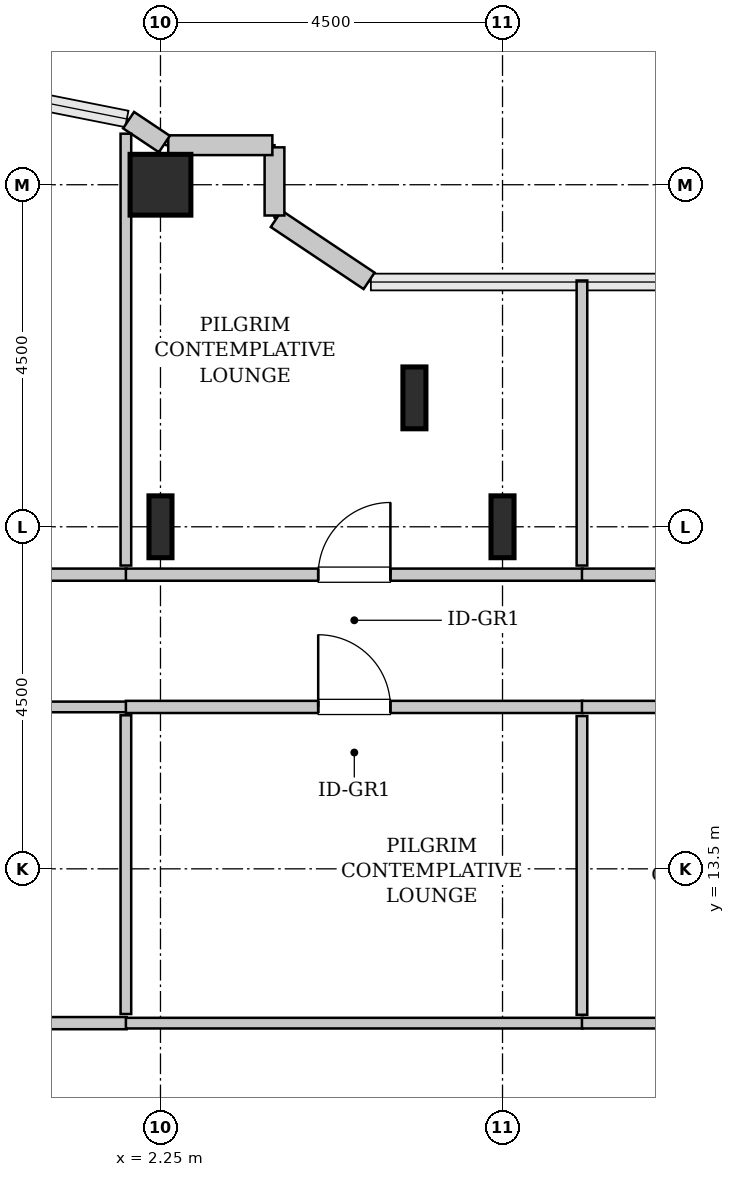
"""IFC4 building model, lengths in metres.
Left out: names, types, materials, properties, quantities, classifications, styles, units other than length and angle.
Written with IfcOpenShell. Run it as: python <this file> out.ifc"""

import sys

from ifc_helpers import new_model, si_unit, direction, frame, frame_2d, origin, origin_2d, place, context, subcontext, project, spatial, rectangle, hollow_rectangle, i_section, extrude, source, transform, mapped, element, fill, save


model = new_model("IFC4")
c1 = context("Model", 3, precision=1e-05, world=origin(), true_north=direction((0.0, 1.0)))
c2 = subcontext(c1, "Body", "Model", "MODEL_VIEW")
j1 = project(units=[si_unit("LENGTHUNIT", "METRE"), si_unit("PLANEANGLEUNIT", "RADIAN")], contexts=[c1])
p1 = place(None, origin())
s1 = spatial("IfcSite", under=j1, at=p1, CompositionType="ELEMENT")
p2 = place(p1, origin())
s2 = spatial("IfcBuilding", under=s1, at=p2, CompositionType="ELEMENT")
p3 = place(p2, frame((0.0, 0.0, 175.4)))
s3 = spatial("IfcBuildingStorey", under=s2, at=p3, CompositionType="ELEMENT", Elevation=175.4)
m1 = source(origin(), c2, "Body", "SweptSolid", [
    extrude(i_section(OverallWidth=0.303, OverallDepth=0.814, WebThickness=0.021, FlangeThickness=0.04, FilletRadius=0.03, at=origin_2d()), origin(), (0.0, 0.0, 1.0), 3.8),
])
p4 = place(p3, frame((2.25, 18.0, 0.0), z_axis=(0.0, 0.0, 1.0), x_axis=(1.0, 0.0, 0.0)))
e1 = element("IfcColumn", 1, at=p4, inside=s3, PredefinedType="COLUMN", context=c2, shape_type="MappedRepresentation", body=[
    mapped(m1, transform((0.0, 0.0, 0.0), x_axis=(1.0, 0.0, 0.0), y_axis=(0.0, 1.0, 0.0), z_axis=(0.0, 0.0, 1.0), scale=1.0)),
])
m2 = source(origin(), c2, "Body", "SweptSolid", [
    extrude(hollow_rectangle(XDim=0.8, YDim=0.8, WallThickness=0.04, InnerFilletRadius=0.04, OuterFilletRadius=0.08, at=origin_2d()), origin(), (0.0, 0.0, 1.0), 3.8),
])
p5 = place(p3, frame((2.25, 22.5, 0.0), z_axis=(0.0, 0.0, 1.0), x_axis=(1.0, 0.0, 0.0)))
e2 = element("IfcColumn", 2, at=p5, inside=s3, PredefinedType="COLUMN", context=c2, shape_type="MappedRepresentation", body=[
    mapped(m2, transform((0.0, 0.0, 0.0), x_axis=(1.0, 0.0, 0.0), y_axis=(0.0, 1.0, 0.0), z_axis=(0.0, 0.0, 1.0), scale=1.0)),
])
for number, where, z_axis, x_axis in (
    (3, (5.591, 19.696, 0.0), (0.0, 0.0, 1.0), (1.0, 0.0, 0.0)),
    (4, (6.75, 18.0, 0.0), (0.0, 0.0, 1.0), (1.0, 0.0, 0.0)),
):
    element("IfcColumn", number, at=place(p3, frame(where, z_axis=z_axis, x_axis=x_axis)), inside=s3, PredefinedType="COLUMN", context=c2, shape_type="MappedRepresentation", body=[
        mapped(m1, transform((0.0, 0.0, 0.0), x_axis=(1.0, 0.0, 0.0), y_axis=(0.0, 1.0, 0.0), z_axis=(0.0, 0.0, 1.0), scale=1.0)),
    ])
m3 = source(origin(), c2, "Body", "SweptSolid", [
    extrude(rectangle(XDim=1.469, YDim=0.26, at=frame_2d((0.734, 0.0))), origin(), (0.0, 0.0, 1.0), 3.55),
])
p6 = place(p3, frame((4.995, 21.236, 0.0), z_axis=(0.0, 0.0, 1.0), x_axis=(-0.831461760506, 0.555581983884, 0.0)))
e5 = element("IfcWall", 5, at=p6, inside=s3, PredefinedType="SOLIDWALL", context=c2, shape_type="MappedRepresentation", body=[
    mapped(m3, transform((0.0, 0.0, 0.0), x_axis=(1.0, 0.0, 0.0), y_axis=(0.0, 1.0, 0.0), z_axis=(0.0, 0.0, 1.0), scale=1.0)),
])
m4 = source(origin(), c2, "Body", "SweptSolid", [
    extrude(rectangle(XDim=0.897, YDim=0.26, at=frame_2d((0.448, 0.0))), origin(), (0.0, 0.0, 1.0), 3.55),
])
p7 = place(p3, frame((3.75, 22.095, 0.0), z_axis=(0.0, 0.0, 1.0), x_axis=(0.0, 1.0, 0.0)))
e6 = element("IfcWall", 6, at=p7, inside=s3, PredefinedType="SOLIDWALL", context=c2, shape_type="MappedRepresentation", body=[
    mapped(m4, transform((0.0, 0.0, 0.0), x_axis=(1.0, 0.0, 0.0), y_axis=(0.0, 1.0, 0.0), z_axis=(0.0, 0.0, 1.0), scale=1.0)),
])
m5 = source(origin(), c2, "Body", "SweptSolid", [
    extrude(rectangle(XDim=1.37, YDim=0.26, at=frame_2d((0.685, 0.0))), origin(), (0.0, 0.0, 1.0), 3.55),
])
p8 = place(p3, frame((3.722, 23.02, 0.0), z_axis=(0.0, 0.0, 1.0), x_axis=(-1.0, 0.0, 0.0)))
e7 = element("IfcWall", 7, at=p8, inside=s3, PredefinedType="SOLIDWALL", context=c2, shape_type="MappedRepresentation", body=[
    mapped(m5, transform((0.0, 0.0, 0.0), x_axis=(1.0, 0.0, 0.0), y_axis=(0.0, 1.0, 0.0), z_axis=(0.0, 0.0, 1.0), scale=1.0)),
])
m6 = source(origin(), c2, "Body", "SweptSolid", [
    extrude(rectangle(XDim=0.565, YDim=0.26, at=frame_2d((0.283, 0.0))), origin(), (0.0, 0.0, 1.0), 3.55),
])
p9 = place(p3, frame((2.301, 23.036, 0.0), z_axis=(0.0, 0.0, 1.0), x_axis=(-0.831651492666, 0.555297933317, 0.0)))
e8 = element("IfcWall", 8, at=p9, inside=s3, PredefinedType="SOLIDWALL", context=c2, shape_type="MappedRepresentation", body=[
    mapped(m6, transform((0.0, 0.0, 0.0), x_axis=(1.0, 0.0, 0.0), y_axis=(0.0, 1.0, 0.0), z_axis=(0.0, 0.0, 1.0), scale=1.0)),
])
m7 = source(origin(), c2, "Body", "SweptSolid", [
    extrude(rectangle(XDim=13.815, YDim=0.16, at=frame_2d((6.907, 0.0))), origin(), (0.0, 0.0, 1.0), 3.535),
])
p10 = place(p3, frame((-12.01, 11.47, 0.0), z_axis=(0.0, 0.0, 1.0), x_axis=(1.0, 0.0, 0.0)))
e9 = element("IfcWall", 9, at=p10, inside=s3, PredefinedType="PARTITIONING", context=c2, shape_type="MappedRepresentation", body=[
    mapped(m7, transform((0.0, 0.0, 0.0), x_axis=(1.0, 0.0, 0.0), y_axis=(0.0, 1.0, 0.0), z_axis=(0.0, 0.0, 1.0), scale=1.0)),
])
p11 = place(p10, frame((6.433, 0.0, 0.0)))
e10 = element("IfcOpeningElement", 10, at=p11, cuts=e9, PredefinedType="OPENING", context=c2, shape_type="SweptSolid", body=[
    extrude(rectangle(XDim=0.95, YDim=2.1, at=frame_2d((0.475, 1.05))), frame((0.0, 0.09, 0.0), z_axis=(0.0, -1.0, 0.0), x_axis=(1.0, 0.0, 0.0)), (0.0, 0.0, 1.0), 0.18),
])
m8 = source(origin(), c2, "Body", "SweptSolid", [
    extrude(rectangle(XDim=13.815, YDim=0.14, at=frame_2d((6.907, 0.0))), origin(), (0.0, 0.0, 1.0), 3.535),
])
p12 = place(p3, frame((-12.01, 15.63, 0.0), z_axis=(0.0, 0.0, 1.0), x_axis=(1.0, 0.0, 0.0)))
e11 = element("IfcWall", 11, at=p12, inside=s3, PredefinedType="PARTITIONING", context=c2, shape_type="MappedRepresentation", body=[
    mapped(m8, transform((0.0, 0.0, 0.0), x_axis=(1.0, 0.0, 0.0), y_axis=(0.0, 1.0, 0.0), z_axis=(0.0, 0.0, 1.0), scale=1.0)),
])
m9 = source(origin(), c2, "Body", "SweptSolid", [
    extrude(rectangle(XDim=3.93, YDim=0.14, at=frame_2d((1.965, 0.0))), origin(), (0.0, 0.0, 1.0), 3.535),
])
p13 = place(p3, frame((1.795, 11.59, 0.0), z_axis=(0.0, 0.0, 1.0), x_axis=(0.0, 1.0, 0.0)))
e12 = element("IfcWall", 12, at=p13, inside=s3, PredefinedType="PARTITIONING", context=c2, shape_type="MappedRepresentation", body=[
    mapped(m9, transform((0.0, 0.0, 0.0), x_axis=(1.0, 0.0, 0.0), y_axis=(0.0, 1.0, 0.0), z_axis=(0.0, 0.0, 1.0), scale=1.0)),
])
m10 = source(origin(), c2, "Body", "SweptSolid", [
    extrude(rectangle(XDim=9.245, YDim=0.16, at=frame_2d((4.623, 0.0))), origin(), (0.0, 0.0, 1.0), 3.535),
])
p14 = place(p3, frame((-7.44, 17.37, 0.0), z_axis=(0.0, 0.0, 1.0), x_axis=(1.0, 0.0, 0.0)))
e13 = element("IfcWall", 13, at=p14, inside=s3, PredefinedType="PARTITIONING", context=c2, shape_type="MappedRepresentation", body=[
    mapped(m10, transform((0.0, 0.0, 0.0), x_axis=(1.0, 0.0, 0.0), y_axis=(0.0, 1.0, 0.0), z_axis=(0.0, 0.0, 1.0), scale=1.0)),
])
p15 = place(p14, frame((3.529, 0.0, 0.0)))
e14 = element("IfcOpeningElement", 14, at=p15, cuts=e13, PredefinedType="OPENING", context=c2, shape_type="SweptSolid", body=[
    extrude(rectangle(XDim=0.95, YDim=2.1, at=frame_2d((0.475, 1.05))), frame((0.0, 0.09, 0.0), z_axis=(0.0, -1.0, 0.0), x_axis=(1.0, 0.0, 0.0)), (0.0, 0.0, 1.0), 0.18),
])
m11 = source(origin(), c2, "Body", "SweptSolid", [
    extrude(rectangle(XDim=5.681, YDim=0.14, at=frame_2d((2.841, 0.0))), origin(), (0.0, 0.0, 1.0), 2.875),
])
p16 = place(p3, frame((1.795, 17.49, 0.0), z_axis=(0.0, 0.0, 1.0), x_axis=(0.0, 1.0, 0.0)))
e15 = element("IfcWall", 15, at=p16, inside=s3, PredefinedType="PARTITIONING", context=c2, shape_type="MappedRepresentation", body=[
    mapped(m11, transform((0.0, 0.0, 0.0), x_axis=(1.0, 0.0, 0.0), y_axis=(0.0, 1.0, 0.0), z_axis=(0.0, 0.0, 1.0), scale=1.0)),
])
m12 = source(origin(), c2, "Body", "SweptSolid", [
    extrude(rectangle(XDim=6.01, YDim=0.16, at=frame_2d((3.005, 0.0))), origin(), (0.0, 0.0, 1.0), 3.535),
])
p17 = place(p3, frame((1.795, 17.37, 0.0), z_axis=(0.0, 0.0, 1.0), x_axis=(1.0, 0.0, 0.0)))
e16 = element("IfcWall", 16, at=p17, inside=s3, PredefinedType="PARTITIONING", context=c2, shape_type="MappedRepresentation", body=[
    mapped(m12, transform((0.0, 0.0, 0.0), x_axis=(1.0, 0.0, 0.0), y_axis=(0.0, 1.0, 0.0), z_axis=(0.0, 0.0, 1.0), scale=1.0)),
])
p18 = place(p17, frame((2.53, 0.0, 0.0)))
e17 = element("IfcOpeningElement", 17, at=p18, cuts=e16, PredefinedType="OPENING", context=c2, shape_type="SweptSolid", body=[
    extrude(rectangle(XDim=0.95, YDim=2.1, at=frame_2d((0.475, 1.05))), frame((0.0, 0.09, 0.0), z_axis=(0.0, -1.0, 0.0), x_axis=(1.0, 0.0, 0.0)), (0.0, 0.0, 1.0), 0.18),
])
m13 = source(origin(), c2, "Body", "SweptSolid", [
    extrude(rectangle(XDim=3.75, YDim=0.14, at=frame_2d((1.875, 0.0))), origin(), (0.0, 0.0, 1.0), 3.535),
])
p19 = place(p3, frame((7.795, 17.49, 0.0), z_axis=(0.0, 0.0, 1.0), x_axis=(0.0, 1.0, 0.0)))
e18 = element("IfcWall", 18, at=p19, inside=s3, PredefinedType="PARTITIONING", context=c2, shape_type="MappedRepresentation", body=[
    mapped(m13, transform((0.0, 0.0, 0.0), x_axis=(1.0, 0.0, 0.0), y_axis=(0.0, 1.0, 0.0), z_axis=(0.0, 0.0, 1.0), scale=1.0)),
])
p20 = place(p3, frame((1.795, 15.63, 0.0), z_axis=(0.0, 0.0, 1.0), x_axis=(1.0, 0.0, 0.0)))
e19 = element("IfcWall", 19, at=p20, inside=s3, PredefinedType="PARTITIONING", context=c2, shape_type="MappedRepresentation", body=[
    mapped(m12, transform((0.0, 0.0, 0.0), x_axis=(1.0, 0.0, 0.0), y_axis=(0.0, 1.0, 0.0), z_axis=(0.0, 0.0, 1.0), scale=1.0)),
])
p21 = place(p20, frame((2.53, 0.0, 0.0)))
e20 = element("IfcOpeningElement", 20, at=p21, cuts=e19, PredefinedType="OPENING", context=c2, shape_type="SweptSolid", body=[
    extrude(rectangle(XDim=0.95, YDim=2.1, at=frame_2d((0.475, 1.05))), frame((0.0, 0.09, 0.0), z_axis=(0.0, -1.0, 0.0), x_axis=(1.0, 0.0, 0.0)), (0.0, 0.0, 1.0), 0.18),
])
m14 = source(origin(), c2, "Body", "SweptSolid", [
    extrude(rectangle(XDim=6.01, YDim=0.14, at=frame_2d((3.005, 0.0))), origin(), (0.0, 0.0, 1.0), 3.535),
])
p22 = place(p3, frame((1.795, 11.47, 0.0), z_axis=(0.0, 0.0, 1.0), x_axis=(1.0, 0.0, 0.0)))
e21 = element("IfcWall", 21, at=p22, inside=s3, PredefinedType="PARTITIONING", context=c2, shape_type="MappedRepresentation", body=[
    mapped(m14, transform((0.0, 0.0, 0.0), x_axis=(1.0, 0.0, 0.0), y_axis=(0.0, 1.0, 0.0), z_axis=(0.0, 0.0, 1.0), scale=1.0)),
])
p23 = place(p3, frame((7.795, 11.58, 0.0), z_axis=(0.0, 0.0, 1.0), x_axis=(0.0, 1.0, 0.0)))
e22 = element("IfcWall", 22, at=p23, inside=s3, PredefinedType="PARTITIONING", context=c2, shape_type="MappedRepresentation", body=[
    mapped(m9, transform((0.0, 0.0, 0.0), x_axis=(1.0, 0.0, 0.0), y_axis=(0.0, 1.0, 0.0), z_axis=(0.0, 0.0, 1.0), scale=1.0)),
])
m15 = source(origin(), c2, "Body", "SweptSolid", [
    extrude(rectangle(XDim=5.825, YDim=0.16, at=frame_2d((2.913, 0.0))), origin(), (0.0, 0.0, 1.0), 3.535),
])
p24 = place(p3, frame((7.795, 17.37, 0.0), z_axis=(0.0, 0.0, 1.0), x_axis=(1.0, 0.0, 0.0)))
e23 = element("IfcWall", 23, at=p24, inside=s3, PredefinedType="PARTITIONING", context=c2, shape_type="MappedRepresentation", body=[
    mapped(m15, transform((0.0, 0.0, 0.0), x_axis=(1.0, 0.0, 0.0), y_axis=(0.0, 1.0, 0.0), z_axis=(0.0, 0.0, 1.0), scale=1.0)),
])
p25 = place(p24, frame((2.092, 0.0, 0.0)))
e24 = element("IfcOpeningElement", 24, at=p25, cuts=e23, PredefinedType="OPENING", context=c2, shape_type="SweptSolid", body=[
    extrude(rectangle(XDim=0.95, YDim=2.1, at=frame_2d((0.475, 1.05))), frame((0.0, 0.09, 0.0), z_axis=(0.0, -1.0, 0.0), x_axis=(1.0, 0.0, 0.0)), (0.0, 0.0, 1.0), 0.18),
])
m16 = source(origin(), c2, "Body", "SweptSolid", [
    extrude(rectangle(XDim=4.215, YDim=0.16, at=frame_2d((2.107, 0.0))), origin(), (0.0, 0.0, 1.0), 3.535),
])
p26 = place(p3, frame((7.795, 15.63, 0.0), z_axis=(0.0, 0.0, 1.0), x_axis=(1.0, 0.0, 0.0)))
e25 = element("IfcWall", 25, at=p26, inside=s3, PredefinedType="PARTITIONING", context=c2, shape_type="MappedRepresentation", body=[
    mapped(m16, transform((0.0, 0.0, 0.0), x_axis=(1.0, 0.0, 0.0), y_axis=(0.0, 1.0, 0.0), z_axis=(0.0, 0.0, 1.0), scale=1.0)),
])
p27 = place(p26, frame((1.633, 0.0, 0.0)))
e26 = element("IfcOpeningElement", 26, at=p27, cuts=e25, PredefinedType="OPENING", context=c2, shape_type="SweptSolid", body=[
    extrude(rectangle(XDim=0.95, YDim=2.1, at=frame_2d((0.475, 1.05))), frame((0.0, 0.09, 0.0), z_axis=(0.0, -1.0, 0.0), x_axis=(1.0, 0.0, 0.0)), (0.0, 0.0, 1.0), 0.18),
])
m17 = source(origin(), c2, "Body", "SweptSolid", [
    extrude(rectangle(XDim=4.215, YDim=0.14, at=frame_2d((2.107, 0.0))), origin(), (0.0, 0.0, 1.0), 3.535),
])
p28 = place(p3, frame((7.795, 11.47, 0.0), z_axis=(0.0, 0.0, 1.0), x_axis=(1.0, 0.0, 0.0)))
e27 = element("IfcWall", 27, at=p28, inside=s3, PredefinedType="PARTITIONING", context=c2, shape_type="MappedRepresentation", body=[
    mapped(m17, transform((0.0, 0.0, 0.0), x_axis=(1.0, 0.0, 0.0), y_axis=(0.0, 1.0, 0.0), z_axis=(0.0, 0.0, 1.0), scale=1.0)),
])
m18 = source(origin(), c2, "Body", "SweptSolid", [
    extrude(rectangle(XDim=0.95, YDim=2.1, at=frame_2d((0.475, 1.05))), frame((0.0, 0.025, 0.0), z_axis=(0.0, -1.0, 0.0), x_axis=(1.0, 0.0, 0.0)), (0.0, 0.0, 1.0), 0.05),
])
p29 = place(p18, origin())
e28 = element("IfcDoor", 28, at=p29, inside=s3, OperationType="SINGLE_SWING_RIGHT", PredefinedType="DOOR", context=c2, shape_type="MappedRepresentation", body=[
    mapped(m18, transform((0.0, 0.0, 0.0), x_axis=(1.0, 0.0, 0.0), y_axis=(0.0, 1.0, 0.0), z_axis=(0.0, 0.0, 1.0), scale=1.0)),
])
fill(e17, e28)
p30 = place(p21, origin())
e29 = element("IfcDoor", 29, at=p30, inside=s3, OperationType="SINGLE_SWING_LEFT", PredefinedType="DOOR", context=c2, shape_type="MappedRepresentation", body=[
    mapped(m18, transform((0.0, 0.0, 0.0), x_axis=(1.0, 0.0, 0.0), y_axis=(0.0, 1.0, 0.0), z_axis=(0.0, 0.0, 1.0), scale=1.0)),
])
fill(e20, e29)
save(model, sys.argv[1])
